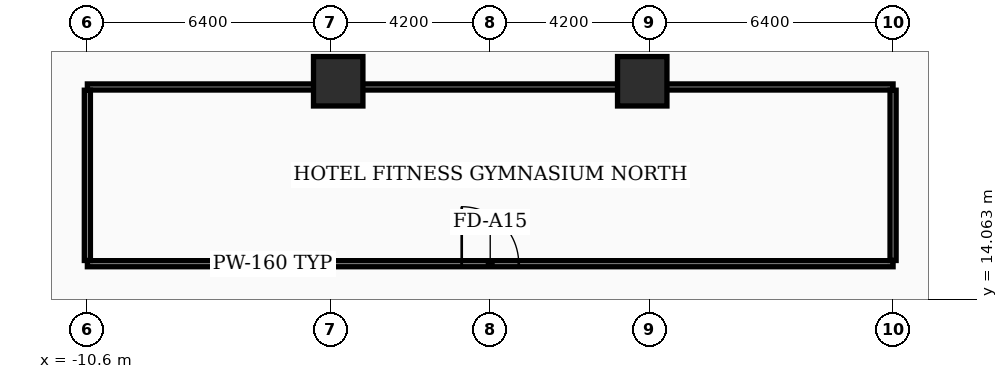
"""IFC4 building model, lengths in metres.
Left out: names, types, materials, properties, quantities, classifications, styles, units other than length and angle.
Written with IfcOpenShell. Run it as: python <this file> out.ifc"""

import sys

from ifc_helpers import new_model, si_unit, direction, frame, frame_2d, origin, origin_2d, place, context, subcontext, project, spatial, rectangle, extrude, element, fill, save


model = new_model("IFC4")
c1 = context("Model", 3, precision=1e-05, world=origin(), true_north=direction((0.0, 1.0)))
c2 = subcontext(c1, "Body", "Model", "MODEL_VIEW")
j1 = project(units=[si_unit("LENGTHUNIT", "METRE"), si_unit("PLANEANGLEUNIT", "RADIAN")], contexts=[c1])
p1 = place(None, origin())
s1 = spatial("IfcSite", under=j1, at=p1, CompositionType="ELEMENT")
p2 = place(p1, origin())
s2 = spatial("IfcBuilding", under=s1, at=p2, CompositionType="ELEMENT")
p3 = place(p2, frame((0.0, 0.0, 19.2)))
s3 = spatial("IfcBuildingStorey", under=s2, at=p3, CompositionType="ELEMENT", Elevation=19.2)
for number, where, z_axis, x_axis in (
    (1, (-4.0, 19.8, 0.0), (0.0, 0.0, 1.0), (1.0, 0.0, 0.0)),
    (2, (4.0, 19.8, 0.0), (0.0, 0.0, 1.0), (1.0, 0.0, 0.0)),
):
    element("IfcColumn", number, at=place(p3, frame(where, z_axis=z_axis, x_axis=x_axis)), inside=s3, PredefinedType="COLUMN", context=c2, shape_type="SweptSolid", body=[
        extrude(rectangle(XDim=1.3, YDim=1.3, at=origin_2d()), origin(), (0.0, 0.0, 1.0), 4.5),
    ])
p4 = place(p3, frame((-10.6, 15.0, 0.0), z_axis=(0.0, 0.0, 1.0), x_axis=(1.0, 0.0, 0.0)))
e3 = element("IfcWall", 3, at=p4, inside=s3, PredefinedType="PARTITIONING", context=c2, shape_type="SweptSolid", body=[
    extrude(rectangle(XDim=21.2, YDim=0.16, at=frame_2d((10.6, 0.0))), origin(), (0.0, 0.0, 1.0), 3.37),
])
p5 = place(p4, frame((9.85, 0.0, 0.0)))
e4 = element("IfcOpeningElement", 4, at=p5, cuts=e3, PredefinedType="OPENING", context=c2, shape_type="SweptSolid", body=[
    extrude(rectangle(XDim=1.5, YDim=2.15, at=frame_2d((0.75, 1.075))), frame((0.0, 0.09, 0.0), z_axis=(0.0, -1.0, 0.0), x_axis=(1.0, 0.0, 0.0)), (0.0, 0.0, 1.0), 0.18),
])
p6 = place(p3, frame((-10.6, 19.65, 0.0), z_axis=(0.0, 0.0, 1.0), x_axis=(1.0, 0.0, 0.0)))
e5 = element("IfcWall", 5, at=p6, inside=s3, PredefinedType="PARTITIONING", context=c2, shape_type="SweptSolid", body=[
    extrude(rectangle(XDim=21.2, YDim=0.16, at=frame_2d((10.6, 0.0))), origin(), (0.0, 0.0, 1.0), 3.37),
])
for number, where, z_axis, x_axis in (
    (6, (-10.6, 15.085, 0.0), (0.0, 0.0, 1.0), (0.0, 1.0, 0.0)),
    (7, (10.6, 15.085, 0.0), (0.0, 0.0, 1.0), (0.0, 1.0, 0.0)),
):
    element("IfcWall", number, at=place(p3, frame(where, z_axis=z_axis, x_axis=x_axis)), inside=s3, PredefinedType="PARTITIONING", context=c2, shape_type="SweptSolid", body=[
        extrude(rectangle(XDim=4.48, YDim=0.16, at=frame_2d((2.24, 0.0))), origin(), (0.0, 0.0, 1.0), 3.37),
    ])
p7 = place(p5, origin())
e8 = element("IfcDoor", 8, at=p7, inside=s3, OperationType="DOUBLE_DOOR_SINGLE_SWING", PredefinedType="DOOR", context=c2, shape_type="SweptSolid", body=[
    extrude(rectangle(XDim=1.5, YDim=2.15, at=frame_2d((0.75, 1.075))), frame((0.0, 0.025, 0.0), z_axis=(0.0, -1.0, 0.0), x_axis=(1.0, 0.0, 0.0)), (0.0, 0.0, 1.0), 0.05),
])
fill(e4, e8)
save(model, sys.argv[1])
